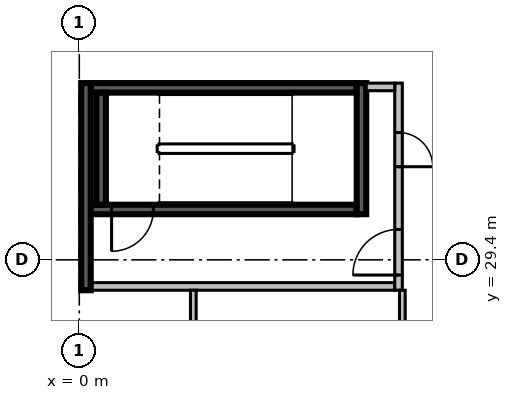
"""IFC4 building model, lengths in metres.
Left out: names, types, materials, properties, quantities, classifications, styles, units other than length and angle.
Written with IfcOpenShell. Run it as: python <this file> out.ifc"""

import sys

from ifc_helpers import new_model, si_unit, direction, frame, frame_2d, origin, place, context, subcontext, project, spatial, rectangle, extrude, source, transform, mapped, element, fill, save


model = new_model("IFC4")
c1 = context("Model", 3, precision=1e-05, world=origin(), true_north=direction((0.0, 1.0)))
c2 = subcontext(c1, "Body", "Model", "MODEL_VIEW")
j1 = project(units=[si_unit("LENGTHUNIT", "METRE"), si_unit("PLANEANGLEUNIT", "RADIAN")], contexts=[c1])
p1 = place(None, origin())
s1 = spatial("IfcSite", under=j1, at=p1, CompositionType="ELEMENT")
p2 = place(p1, origin())
s2 = spatial("IfcBuilding", under=s1, at=p2, CompositionType="ELEMENT")
p3 = place(p2, frame((0.0, 0.0, 7.5)))
s3 = spatial("IfcBuildingStorey", under=s2, at=p3, CompositionType="ELEMENT", Elevation=7.5)
m1 = source(origin(), c2, "Body", "SweptSolid", [
    extrude(rectangle(XDim=7.0, YDim=0.25, at=frame_2d((3.5, 0.0))), origin(), (0.0, 0.0, 1.0), 4.8),
])
p4 = place(p3, frame((0.3, 30.725, 0.0), z_axis=(0.0, 0.0, 1.0), x_axis=(1.0, 0.0, 0.0)))
e1 = element("IfcWall", 1, at=p4, inside=s3, PredefinedType="SOLIDWALL", context=c2, shape_type="MappedRepresentation", body=[
    mapped(m1, transform((0.0, 0.0, 0.0), scale=1.0)),
])
m2 = source(origin(), c2, "Body", "SweptSolid", [
    extrude(rectangle(XDim=1.1, YDim=2.1, at=frame_2d((0.55, 1.05))), frame((0.0, 0.135, 0.0), z_axis=(0.0, -1.0, 0.0), x_axis=(1.0, 0.0, 0.0)), (0.0, 0.0, 1.0), 0.27),
])
p5 = place(p4, frame((0.55, 0.0, 0.0)))
e2 = element("IfcOpeningElement", 2, at=p5, cuts=e1, PredefinedType="OPENING", context=c2, shape_type="MappedRepresentation", body=[
    mapped(m2, transform((0.0, 0.0, 0.0), scale=1.0)),
])
p6 = place(p3, frame((0.3, 33.925, 0.0), z_axis=(0.0, 0.0, 1.0), x_axis=(1.0, 0.0, 0.0)))
e3 = element("IfcWall", 3, at=p6, inside=s3, PredefinedType="SOLIDWALL", context=c2, shape_type="MappedRepresentation", body=[
    mapped(m1, transform((0.0, 0.0, 0.0), scale=1.0)),
])
m3 = source(origin(), c2, "Body", "SweptSolid", [
    extrude(rectangle(XDim=3.45, YDim=0.25, at=frame_2d((1.725, 0.0))), origin(), (0.0, 0.0, 1.0), 4.8),
])
p7 = place(p3, frame((7.425, 30.6, 0.0), z_axis=(0.0, 0.0, 1.0), x_axis=(0.0, 1.0, 0.0)))
e4 = element("IfcWall", 4, at=p7, inside=s3, PredefinedType="SOLIDWALL", context=c2, shape_type="MappedRepresentation", body=[
    mapped(m3, transform((0.0, 0.0, 0.0), scale=1.0)),
])
m4 = source(origin(), c2, "Body", "SweptSolid", [
    extrude(rectangle(XDim=2.95, YDim=0.25, at=frame_2d((1.475, 0.0))), origin(), (0.0, 0.0, 1.0), 4.8),
])
p8 = place(p3, frame((0.575, 30.85, 0.0), z_axis=(0.0, 0.0, 1.0), x_axis=(0.0, 1.0, 0.0)))
e5 = element("IfcWall", 5, at=p8, inside=s3, PredefinedType="SOLIDWALL", context=c2, shape_type="MappedRepresentation", body=[
    mapped(m4, transform((0.0, 0.0, 0.0), scale=1.0)),
])
m5 = source(origin(), c2, "Body", "SweptSolid", [
    extrude(rectangle(XDim=8.0, YDim=0.2, at=frame_2d((4.0, 0.0))), origin(), (0.0, 0.0, 1.0), 4.8),
])
p9 = place(p3, frame((0.3, 28.7, 0.0), z_axis=(0.0, 0.0, 1.0), x_axis=(1.0, 0.0, 0.0)))
e6 = element("IfcWall", 6, at=p9, inside=s3, PredefinedType="PARTITIONING", context=c2, shape_type="MappedRepresentation", body=[
    mapped(m5, transform((0.0, 0.0, 0.0), scale=1.0)),
])
m6 = source(origin(), c2, "Body", "SweptSolid", [
    extrude(rectangle(XDim=5.45, YDim=0.2, at=frame_2d((2.725, 0.0))), origin(), (0.0, 0.0, 1.0), 4.8),
])
p10 = place(p3, frame((8.4, 28.6, 0.0), z_axis=(0.0, 0.0, 1.0), x_axis=(0.0, 1.0, 0.0)))
e7 = element("IfcWall", 7, at=p10, inside=s3, PredefinedType="PARTITIONING", context=c2, shape_type="MappedRepresentation", body=[
    mapped(m6, transform((0.0, 0.0, 0.0), scale=1.0)),
])
m7 = source(origin(), c2, "Body", "SweptSolid", [
    extrude(rectangle(XDim=1.2, YDim=2.1, at=frame_2d((0.6, 1.05))), frame((0.0, 0.11, 0.0), z_axis=(0.0, -1.0, 0.0), x_axis=(1.0, 0.0, 0.0)), (0.0, 0.0, 1.0), 0.22),
])
p11 = place(p10, frame((0.4, 0.0, 0.0)))
e8 = element("IfcOpeningElement", 8, at=p11, cuts=e7, PredefinedType="OPENING", context=c2, shape_type="MappedRepresentation", body=[
    mapped(m7, transform((0.0, 0.0, 0.0), scale=1.0)),
])
m8 = source(origin(), c2, "Body", "SweptSolid", [
    extrude(rectangle(XDim=0.9, YDim=2.1, at=frame_2d((0.45, 1.05))), frame((0.0, 0.11, 0.0), z_axis=(0.0, -1.0, 0.0), x_axis=(1.0, 0.0, 0.0)), (0.0, 0.0, 1.0), 0.22),
])
p12 = place(p10, frame((3.25, 0.0, 0.0)))
e9 = element("IfcOpeningElement", 9, at=p12, cuts=e7, PredefinedType="OPENING", context=c2, shape_type="MappedRepresentation", body=[
    mapped(m8, transform((0.0, 0.0, 0.0), scale=1.0)),
])
m9 = source(origin(), c2, "Body", "SweptSolid", [
    extrude(rectangle(XDim=0.75, YDim=0.2, at=frame_2d((0.375, 0.0))), origin(), (0.0, 0.0, 1.0), 4.8),
])
p13 = place(p3, frame((7.55, 33.95, 0.0), z_axis=(0.0, 0.0, 1.0), x_axis=(1.0, 0.0, 0.0)))
e10 = element("IfcWall", 10, at=p13, inside=s3, PredefinedType="PARTITIONING", context=c2, shape_type="MappedRepresentation", body=[
    mapped(m9, transform((0.0, 0.0, 0.0), scale=1.0)),
])
m10 = source(origin(), c2, "Body", "SweptSolid", [
    extrude(rectangle(XDim=5.45, YDim=0.25, at=frame_2d((2.725, 0.0))), origin(), (0.0, 0.0, 1.0), 4.8),
])
p14 = place(p3, frame((0.175, 28.6, 0.0), z_axis=(0.0, 0.0, 1.0), x_axis=(0.0, 1.0, 0.0)))
e11 = element("IfcWall", 11, at=p14, inside=s3, PredefinedType="SOLIDWALL", context=c2, shape_type="MappedRepresentation", body=[
    mapped(m10, transform((0.0, 0.0, 0.0), scale=1.0)),
])
p15 = place(p3, frame((3.0, 22.2, 0.0), z_axis=(0.0, 0.0, 1.0), x_axis=(0.0, 1.0, 0.0)))
e12 = element("IfcWall", 12, at=p15, inside=s3, PredefinedType="PARTITIONING", context=c2, shape_type="SweptSolid", body=[
    extrude(rectangle(XDim=6.4, YDim=0.15, at=frame_2d((3.2, 0.0))), origin(), (0.0, 0.0, 1.0), 4.8),
])
m11 = source(origin(), c2, "Body", "SweptSolid", [
    extrude(rectangle(XDim=6.4, YDim=0.15, at=frame_2d((3.2, 0.0))), origin(), (0.0, 0.0, 1.0), 4.8),
])
p16 = place(p3, frame((8.5, 22.2, 0.0), z_axis=(0.0, 0.0, 1.0), x_axis=(0.0, 1.0, 0.0)))
e13 = element("IfcWall", 13, at=p16, inside=s3, PredefinedType="PARTITIONING", context=c2, shape_type="MappedRepresentation", body=[
    mapped(m11, transform((0.0, 0.0, 0.0), scale=1.0)),
])
m12 = source(origin(), c2, "Body", "SweptSolid", [
    extrude(rectangle(XDim=0.9, YDim=2.1, at=frame_2d((0.45, 1.05))), frame((0.0, 0.085, 0.0), z_axis=(0.0, -1.0, 0.0), x_axis=(1.0, 0.0, 0.0)), (0.0, 0.0, 1.0), 0.17),
])
p17 = place(p16, frame((2.75, 0.0, 0.0)))
e14 = element("IfcOpeningElement", 14, at=p17, cuts=e13, PredefinedType="OPENING", context=c2, shape_type="MappedRepresentation", body=[
    mapped(m12, transform((0.0, 0.0, 0.0), scale=1.0)),
])
m13 = source(origin(), c2, "Body", "SweptSolid", [
    extrude(rectangle(XDim=1.1, YDim=2.1, at=frame_2d((0.55, 1.05))), frame((0.0, 0.025, 0.0), z_axis=(0.0, -1.0, 0.0), x_axis=(1.0, 0.0, 0.0)), (0.0, 0.0, 1.0), 0.05),
])
p18 = place(p5, origin())
e15 = element("IfcDoor", 15, at=p18, inside=s3, OperationType="SINGLE_SWING_RIGHT", PredefinedType="DOOR", context=c2, shape_type="MappedRepresentation", body=[
    mapped(m13, transform((0.0, 0.0, 0.0), scale=1.0)),
])
fill(e2, e15)
m14 = source(origin(), c2, "Body", "SweptSolid", [
    extrude(rectangle(XDim=1.2, YDim=2.1, at=frame_2d((0.6, 1.05))), frame((0.0, 0.025, 0.0), z_axis=(0.0, -1.0, 0.0), x_axis=(1.0, 0.0, 0.0)), (0.0, 0.0, 1.0), 0.05),
])
p19 = place(p11, origin())
e16 = element("IfcDoor", 16, at=p19, inside=s3, OperationType="SINGLE_SWING_LEFT", PredefinedType="DOOR", context=c2, shape_type="MappedRepresentation", body=[
    mapped(m14, transform((0.0, 0.0, 0.0), scale=1.0)),
])
fill(e8, e16)
m15 = source(origin(), c2, "Body", "SweptSolid", [
    extrude(rectangle(XDim=0.9, YDim=2.1, at=frame_2d((0.45, 1.05))), frame((0.0, 0.025, 0.0), z_axis=(0.0, -1.0, 0.0), x_axis=(1.0, 0.0, 0.0)), (0.0, 0.0, 1.0), 0.05),
])
p20 = place(p12, origin())
e17 = element("IfcDoor", 17, at=p20, inside=s3, OperationType="SINGLE_SWING_RIGHT", PredefinedType="DOOR", context=c2, shape_type="MappedRepresentation", body=[
    mapped(m15, transform((0.0, 0.0, 0.0), scale=1.0)),
])
fill(e9, e17)
save(model, sys.argv[1])
